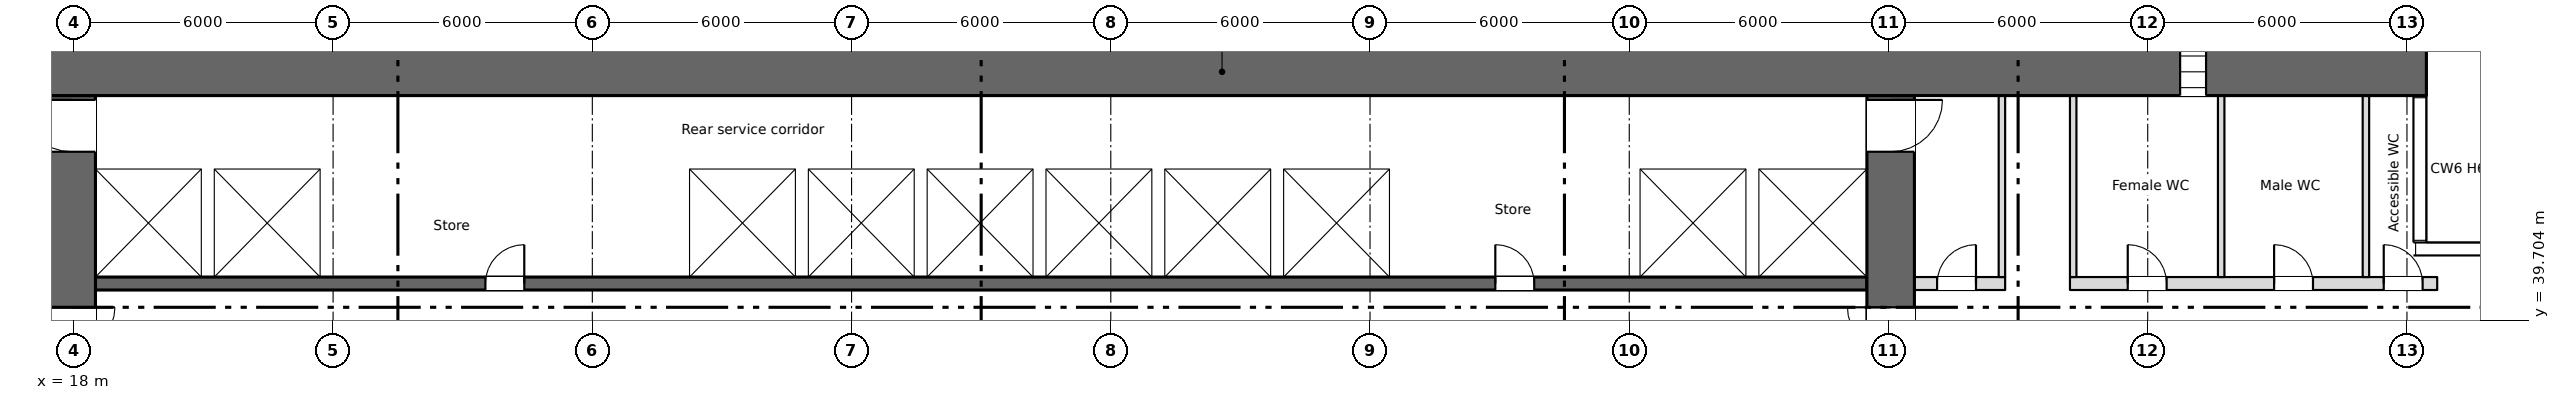
"""IFC4 building model, lengths in metres.
Left out: names, types, materials, properties, quantities, classifications, styles, units other than length and angle.
Written with IfcOpenShell. Run it as: python <this file> out.ifc"""

import sys

from ifc_helpers import new_model, si_unit, direction, frame, frame_2d, origin, place, context, subcontext, project, spatial, rectangle, extrude, element, fill, save


model = new_model("IFC4")
c1 = context("Model", 3, precision=1e-05, world=origin(), true_north=direction((0.0, 1.0)))
c2 = subcontext(c1, "Body", "Model", "MODEL_VIEW")
j1 = project(units=[si_unit("LENGTHUNIT", "METRE"), si_unit("PLANEANGLEUNIT", "RADIAN")], contexts=[c1])
p1 = place(None, origin())
s1 = spatial("IfcSite", under=j1, at=p1, CompositionType="ELEMENT")
p2 = place(p1, origin())
s2 = spatial("IfcBuilding", under=s1, at=p2, CompositionType="ELEMENT")
p3 = place(p2, frame((0.0, 0.0, 11.3)))
s3 = spatial("IfcBuildingStorey", under=s2, at=p3, CompositionType="ELEMENT", Elevation=11.3)
p4 = place(p3, frame((5.55, 45.45, 0.0), z_axis=(0.0, 0.0, 1.0), x_axis=(1.0, 0.0, 0.0)))
e1 = element("IfcWall", 1, at=p4, inside=s3, PredefinedType="SHEAR", context=c2, shape_type="SweptSolid", body=[
    extrude(rectangle(XDim=66.9, YDim=1.1, at=frame_2d((33.45, 0.0))), origin(), (0.0, 0.0, 1.0), 6.1),
])
p5 = place(p4, frame((1.2, 0.0, 0.6)))
e2 = element("IfcOpeningElement", 2, at=p5, cuts=e1, PredefinedType="OPENING", context=c2, shape_type="SweptSolid", body=[
    extrude(rectangle(XDim=0.6, YDim=2.7, at=frame_2d((0.3, 1.35))), frame((0.0, 0.56, 0.0), z_axis=(0.0, -1.0, 0.0), x_axis=(1.0, 0.0, 0.0)), (0.0, 0.0, 1.0), 1.12),
])
p6 = place(p4, frame((7.2, 0.0, 0.6)))
e3 = element("IfcOpeningElement", 3, at=p6, cuts=e1, PredefinedType="OPENING", context=c2, shape_type="SweptSolid", body=[
    extrude(rectangle(XDim=0.6, YDim=2.7, at=frame_2d((0.3, 1.35))), frame((0.0, 0.56, 0.0), z_axis=(0.0, -1.0, 0.0), x_axis=(1.0, 0.0, 0.0)), (0.0, 0.0, 1.0), 1.12),
])
p7 = place(p4, frame((61.2, 0.0, 0.6)))
e4 = element("IfcOpeningElement", 4, at=p7, cuts=e1, PredefinedType="OPENING", context=c2, shape_type="SweptSolid", body=[
    extrude(rectangle(XDim=0.6, YDim=2.7, at=frame_2d((0.3, 1.35))), frame((0.0, 0.56, 0.0), z_axis=(0.0, -1.0, 0.0), x_axis=(1.0, 0.0, 0.0)), (0.0, 0.0, 1.0), 1.12),
])
p8 = place(p3, frame((72.85, 28.4, 0.0), z_axis=(0.0, 0.0, 1.0), x_axis=(0.0, 1.0, 0.0)))
e5 = element("IfcWall", 5, at=p8, inside=s3, PredefinedType="SHEAR", context=c2, shape_type="SweptSolid", body=[
    extrude(rectangle(XDim=12.85, YDim=0.3, at=frame_2d((6.425, 0.0))), origin(), (0.0, 0.0, 1.0), 6.1),
])
p9 = place(p3, frame((17.95, 28.4, 0.0), z_axis=(0.0, 0.0, 1.0), x_axis=(0.0, 1.0, 0.0)))
e6 = element("IfcWall", 6, at=p9, inside=s3, PredefinedType="SHEAR", context=c2, shape_type="SweptSolid", body=[
    extrude(rectangle(XDim=16.5, YDim=1.1, at=frame_2d((8.25, 0.0))), origin(), (0.0, 0.0, 1.0), 6.1),
])
p10 = place(p9, frame((9.6, 0.0, 0.0)))
e7 = element("IfcOpeningElement", 7, at=p10, cuts=e6, PredefinedType="OPENING", context=c2, shape_type="SweptSolid", body=[
    extrude(rectangle(XDim=2.0, YDim=2.1, at=frame_2d((1.0, 1.05))), frame((0.0, 0.56, 0.0), z_axis=(0.0, -1.0, 0.0), x_axis=(1.0, 0.0, 0.0)), (0.0, 0.0, 1.0), 1.12),
])
p11 = place(p9, frame((15.2, 0.0, 0.0)))
e8 = element("IfcOpeningElement", 8, at=p11, cuts=e6, PredefinedType="OPENING", context=c2, shape_type="SweptSolid", body=[
    extrude(rectangle(XDim=1.2, YDim=2.1, at=frame_2d((0.6, 1.05))), frame((0.0, 0.56, 0.0), z_axis=(0.0, -1.0, 0.0), x_axis=(1.0, 0.0, 0.0)), (0.0, 0.0, 1.0), 1.12),
])
p12 = place(p3, frame((60.05, 28.4, 0.0), z_axis=(0.0, 0.0, 1.0), x_axis=(0.0, 1.0, 0.0)))
e9 = element("IfcWall", 9, at=p12, inside=s3, PredefinedType="SHEAR", context=c2, shape_type="SweptSolid", body=[
    extrude(rectangle(XDim=16.5, YDim=1.1, at=frame_2d((8.25, 0.0))), origin(), (0.0, 0.0, 1.0), 6.1),
])
p13 = place(p12, frame((9.6, 0.0, 0.0)))
e10 = element("IfcOpeningElement", 10, at=p13, cuts=e9, PredefinedType="OPENING", context=c2, shape_type="SweptSolid", body=[
    extrude(rectangle(XDim=2.0, YDim=2.1, at=frame_2d((1.0, 1.05))), frame((0.0, 0.56, 0.0), z_axis=(0.0, -1.0, 0.0), x_axis=(1.0, 0.0, 0.0)), (0.0, 0.0, 1.0), 1.12),
])
p14 = place(p12, frame((15.2, 0.0, 0.0)))
e11 = element("IfcOpeningElement", 11, at=p14, cuts=e9, PredefinedType="OPENING", context=c2, shape_type="SweptSolid", body=[
    extrude(rectangle(XDim=1.2, YDim=2.1, at=frame_2d((0.6, 1.05))), frame((0.0, 0.56, 0.0), z_axis=(0.0, -1.0, 0.0), x_axis=(1.0, 0.0, 0.0)), (0.0, 0.0, 1.0), 1.12),
])
p15 = place(p3, frame((18.5, 40.55, 0.0), z_axis=(0.0, 0.0, 1.0), x_axis=(1.0, 0.0, 0.0)))
e12 = element("IfcWall", 12, at=p15, inside=s3, PredefinedType="SHEAR", context=c2, shape_type="SweptSolid", body=[
    extrude(rectangle(XDim=41.0, YDim=0.3, at=frame_2d((20.5, 0.0))), origin(), (0.0, 0.0, 1.0), 6.1),
])
p16 = place(p15, frame((9.025, 0.0, 0.0)))
e13 = element("IfcOpeningElement", 13, at=p16, cuts=e12, PredefinedType="OPENING", context=c2, shape_type="SweptSolid", body=[
    extrude(rectangle(XDim=0.9, YDim=2.1, at=frame_2d((0.45, 1.05))), frame((0.0, 0.16, 0.0), z_axis=(0.0, -1.0, 0.0), x_axis=(1.0, 0.0, 0.0)), (0.0, 0.0, 1.0), 0.32),
])
p17 = place(p15, frame((32.4, 0.0, 0.0)))
e14 = element("IfcOpeningElement", 14, at=p17, cuts=e12, PredefinedType="OPENING", context=c2, shape_type="SweptSolid", body=[
    extrude(rectangle(XDim=0.9, YDim=2.1, at=frame_2d((0.45, 1.05))), frame((0.0, 0.16, 0.0), z_axis=(0.0, -1.0, 0.0), x_axis=(1.0, 0.0, 0.0)), (0.0, 0.0, 1.0), 0.32),
])
p18 = place(p15, frame((14.425, 0.0, 0.0)))
e15 = element("IfcOpeningElement", 15, at=p18, cuts=e12, PredefinedType="OPENING", context=c2, shape_type="SweptSolid", body=[
    extrude(rectangle(XDim=1.1, YDim=2.1, at=frame_2d((0.55, 1.05))), frame((0.0, 0.16, 0.0), z_axis=(0.0, -1.0, 0.0), x_axis=(1.0, 0.0, 0.0)), (0.0, 0.0, 1.0), 0.32),
])
p19 = place(p15, frame((17.175, 0.0, 0.0)))
e16 = element("IfcOpeningElement", 16, at=p19, cuts=e12, PredefinedType="OPENING", context=c2, shape_type="SweptSolid", body=[
    extrude(rectangle(XDim=1.1, YDim=2.1, at=frame_2d((0.55, 1.05))), frame((0.0, 0.16, 0.0), z_axis=(0.0, -1.0, 0.0), x_axis=(1.0, 0.0, 0.0)), (0.0, 0.0, 1.0), 0.32),
])
p20 = place(p15, frame((19.925, 0.0, 0.0)))
e17 = element("IfcOpeningElement", 17, at=p20, cuts=e12, PredefinedType="OPENING", context=c2, shape_type="SweptSolid", body=[
    extrude(rectangle(XDim=1.1, YDim=2.1, at=frame_2d((0.55, 1.05))), frame((0.0, 0.16, 0.0), z_axis=(0.0, -1.0, 0.0), x_axis=(1.0, 0.0, 0.0)), (0.0, 0.0, 1.0), 0.32),
])
p21 = place(p15, frame((22.675, 0.0, 0.0)))
e18 = element("IfcOpeningElement", 18, at=p21, cuts=e12, PredefinedType="OPENING", context=c2, shape_type="SweptSolid", body=[
    extrude(rectangle(XDim=1.1, YDim=2.1, at=frame_2d((0.55, 1.05))), frame((0.0, 0.16, 0.0), z_axis=(0.0, -1.0, 0.0), x_axis=(1.0, 0.0, 0.0)), (0.0, 0.0, 1.0), 0.32),
])
p22 = place(p15, frame((36.375, 0.0, 0.0)))
e19 = element("IfcOpeningElement", 19, at=p22, cuts=e12, PredefinedType="OPENING", context=c2, shape_type="SweptSolid", body=[
    extrude(rectangle(XDim=1.2, YDim=2.1, at=frame_2d((0.6, 1.05))), frame((0.0, 0.16, 0.0), z_axis=(0.0, -1.0, 0.0), x_axis=(1.0, 0.0, 0.0)), (0.0, 0.0, 1.0), 0.32),
])
p23 = place(p15, frame((39.15, 0.0, 0.0)))
e20 = element("IfcOpeningElement", 20, at=p23, cuts=e12, PredefinedType="OPENING", context=c2, shape_type="SweptSolid", body=[
    extrude(rectangle(XDim=1.2, YDim=2.1, at=frame_2d((0.6, 1.05))), frame((0.0, 0.16, 0.0), z_axis=(0.0, -1.0, 0.0), x_axis=(1.0, 0.0, 0.0)), (0.0, 0.0, 1.0), 0.32),
])
p24 = place(p3, frame((18.5, 43.35, 0.0), z_axis=(0.0, 0.0, 1.0), x_axis=(1.0, 0.0, 0.0)))
e21 = element("IfcWall", 21, at=p24, inside=s3, PredefinedType="SHEAR", context=c2, shape_type="SweptSolid", body=[
    extrude(rectangle(XDim=41.0, YDim=0.3, at=frame_2d((20.5, 0.0))), origin(), (0.0, 0.0, 1.0), 6.1),
])
p25 = place(p3, frame((60.6, 40.55, 0.0), z_axis=(0.0, 0.0, 1.0), x_axis=(1.0, 0.0, 0.0)))
e22 = element("IfcWall", 22, at=p25, inside=s3, PredefinedType="PARTITIONING", context=c2, shape_type="SweptSolid", body=[
    extrude(rectangle(XDim=2.1, YDim=0.3, at=frame_2d((1.05, 0.0))), origin(), (0.0, 0.0, 1.0), 6.1),
])
p26 = place(p25, frame((0.525, 0.0, 0.0)))
e23 = element("IfcOpeningElement", 23, at=p26, cuts=e22, PredefinedType="OPENING", context=c2, shape_type="SweptSolid", body=[
    extrude(rectangle(XDim=0.9, YDim=2.1, at=frame_2d((0.45, 1.05))), frame((0.0, 0.16, 0.0), z_axis=(0.0, -1.0, 0.0), x_axis=(1.0, 0.0, 0.0)), (0.0, 0.0, 1.0), 0.32),
])
p27 = place(p3, frame((64.2, 40.55, 0.0), z_axis=(0.0, 0.0, 1.0), x_axis=(1.0, 0.0, 0.0)))
e24 = element("IfcWall", 24, at=p27, inside=s3, PredefinedType="PARTITIONING", context=c2, shape_type="SweptSolid", body=[
    extrude(rectangle(XDim=8.5, YDim=0.3, at=frame_2d((4.25, 0.0))), origin(), (0.0, 0.0, 1.0), 6.1),
])
p28 = place(p27, frame((1.337, 0.0, 0.0)))
e25 = element("IfcOpeningElement", 25, at=p28, cuts=e24, PredefinedType="OPENING", context=c2, shape_type="SweptSolid", body=[
    extrude(rectangle(XDim=0.9, YDim=2.1, at=frame_2d((0.45, 1.05))), frame((0.0, 0.16, 0.0), z_axis=(0.0, -1.0, 0.0), x_axis=(1.0, 0.0, 0.0)), (0.0, 0.0, 1.0), 0.32),
])
p29 = place(p27, frame((4.725, 0.0, 0.0)))
e26 = element("IfcOpeningElement", 26, at=p29, cuts=e24, PredefinedType="OPENING", context=c2, shape_type="SweptSolid", body=[
    extrude(rectangle(XDim=0.9, YDim=2.1, at=frame_2d((0.45, 1.05))), frame((0.0, 0.16, 0.0), z_axis=(0.0, -1.0, 0.0), x_axis=(1.0, 0.0, 0.0)), (0.0, 0.0, 1.0), 0.32),
])
p30 = place(p27, frame((7.262, 0.0, 0.0)))
e27 = element("IfcOpeningElement", 27, at=p30, cuts=e24, PredefinedType="OPENING", context=c2, shape_type="SweptSolid", body=[
    extrude(rectangle(XDim=0.9, YDim=2.1, at=frame_2d((0.45, 1.05))), frame((0.0, 0.16, 0.0), z_axis=(0.0, -1.0, 0.0), x_axis=(1.0, 0.0, 0.0)), (0.0, 0.0, 1.0), 0.32),
])
for number, where, z_axis, x_axis in (
    (28, (21.1, 40.7, 0.0), (0.0, 0.0, 1.0), (0.0, 1.0, 0.0)),
    (29, (23.85, 40.7, 0.0), (0.0, 0.0, 1.0), (0.0, 1.0, 0.0)),
    (30, (32.1, 40.7, 0.0), (0.0, 0.0, 1.0), (0.0, 1.0, 0.0)),
    (31, (34.85, 40.7, 0.0), (0.0, 0.0, 1.0), (0.0, 1.0, 0.0)),
    (32, (37.6, 40.7, 0.0), (0.0, 0.0, 1.0), (0.0, 1.0, 0.0)),
    (33, (40.35, 40.7, 0.0), (0.0, 0.0, 1.0), (0.0, 1.0, 0.0)),
    (34, (43.1, 40.7, 0.0), (0.0, 0.0, 1.0), (0.0, 1.0, 0.0)),
    (35, (45.85, 40.7, 0.0), (0.0, 0.0, 1.0), (0.0, 1.0, 0.0)),
    (36, (48.6, 40.7, 0.0), (0.0, 0.0, 1.0), (0.0, 1.0, 0.0)),
    (37, (54.1, 40.7, 0.0), (0.0, 0.0, 1.0), (0.0, 1.0, 0.0)),
    (38, (56.85, 40.7, 0.0), (0.0, 0.0, 1.0), (0.0, 1.0, 0.0)),
):
    element("IfcWall", number, at=place(p3, frame(where, z_axis=z_axis, x_axis=x_axis)), inside=s3, PredefinedType="SHEAR", context=c2, shape_type="SweptSolid", body=[
        extrude(rectangle(XDim=2.5, YDim=0.3, at=frame_2d((1.25, 0.0))), origin(), (0.0, 0.0, 1.0), 6.1),
    ])
for number, where, z_axis, x_axis in (
    (39, (62.625, 40.7, 0.0), (0.0, 0.0, 1.0), (0.0, 1.0, 0.0)),
    (40, (64.275, 40.7, 0.0), (0.0, 0.0, 1.0), (0.0, 1.0, 0.0)),
    (41, (67.7, 40.7, 0.0), (0.0, 0.0, 1.0), (0.0, 1.0, 0.0)),
    (42, (71.05, 40.7, 0.0), (0.0, 0.0, 1.0), (0.0, 1.0, 0.0)),
):
    element("IfcWall", number, at=place(p3, frame(where, z_axis=z_axis, x_axis=x_axis)), inside=s3, PredefinedType="PARTITIONING", context=c2, shape_type="SweptSolid", body=[
        extrude(rectangle(XDim=4.2, YDim=0.15, at=frame_2d((2.1, 0.0))), origin(), (0.0, 0.0, 1.0), 6.1),
    ])
p31 = place(p7, origin())
e43 = element("IfcWindow", 43, at=p31, inside=s3, PartitioningType="SINGLE_PANEL", PredefinedType="WINDOW", context=c2, shape_type="SweptSolid", body=[
    extrude(rectangle(XDim=0.6, YDim=2.7, at=frame_2d((0.3, 1.35))), frame((0.0, 0.03, 0.0), z_axis=(0.0, -1.0, 0.0), x_axis=(1.0, 0.0, 0.0)), (0.0, 0.0, 1.0), 0.06),
])
fill(e4, e43)
p32 = place(p26, origin())
e44 = element("IfcDoor", 44, at=p32, inside=s3, OperationType="SINGLE_SWING_RIGHT", PredefinedType="DOOR", context=c2, shape_type="SweptSolid", body=[
    extrude(rectangle(XDim=0.9, YDim=2.1, at=frame_2d((0.45, 1.05))), frame((0.0, 0.025, 0.0), z_axis=(0.0, -1.0, 0.0), x_axis=(1.0, 0.0, 0.0)), (0.0, 0.0, 1.0), 0.05),
])
fill(e23, e44)
p33 = place(p28, origin())
e45 = element("IfcDoor", 45, at=p33, inside=s3, OperationType="SINGLE_SWING_LEFT", PredefinedType="DOOR", context=c2, shape_type="SweptSolid", body=[
    extrude(rectangle(XDim=0.9, YDim=2.1, at=frame_2d((0.45, 1.05))), frame((0.0, 0.025, 0.0), z_axis=(0.0, -1.0, 0.0), x_axis=(1.0, 0.0, 0.0)), (0.0, 0.0, 1.0), 0.05),
])
fill(e25, e45)
p34 = place(p29, origin())
e46 = element("IfcDoor", 46, at=p34, inside=s3, OperationType="SINGLE_SWING_LEFT", PredefinedType="DOOR", context=c2, shape_type="SweptSolid", body=[
    extrude(rectangle(XDim=0.9, YDim=2.1, at=frame_2d((0.45, 1.05))), frame((0.0, 0.025, 0.0), z_axis=(0.0, -1.0, 0.0), x_axis=(1.0, 0.0, 0.0)), (0.0, 0.0, 1.0), 0.05),
])
fill(e26, e46)
p35 = place(p30, origin())
e47 = element("IfcDoor", 47, at=p35, inside=s3, OperationType="SINGLE_SWING_LEFT", PredefinedType="DOOR", context=c2, shape_type="SweptSolid", body=[
    extrude(rectangle(XDim=0.9, YDim=2.1, at=frame_2d((0.45, 1.05))), frame((0.0, 0.025, 0.0), z_axis=(0.0, -1.0, 0.0), x_axis=(1.0, 0.0, 0.0)), (0.0, 0.0, 1.0), 0.05),
])
fill(e27, e47)
p36 = place(p16, origin())
e48 = element("IfcDoor", 48, at=p36, inside=s3, OperationType="SINGLE_SWING_RIGHT", PredefinedType="DOOR", context=c2, shape_type="SweptSolid", body=[
    extrude(rectangle(XDim=0.9, YDim=2.1, at=frame_2d((0.45, 1.05))), frame((0.0, 0.025, 0.0), z_axis=(0.0, -1.0, 0.0), x_axis=(1.0, 0.0, 0.0)), (0.0, 0.0, 1.0), 0.05),
])
fill(e13, e48)
p37 = place(p17, origin())
e49 = element("IfcDoor", 49, at=p37, inside=s3, OperationType="SINGLE_SWING_LEFT", PredefinedType="DOOR", context=c2, shape_type="SweptSolid", body=[
    extrude(rectangle(XDim=0.9, YDim=2.1, at=frame_2d((0.45, 1.05))), frame((0.0, 0.025, 0.0), z_axis=(0.0, -1.0, 0.0), x_axis=(1.0, 0.0, 0.0)), (0.0, 0.0, 1.0), 0.05),
])
fill(e14, e49)
p38 = place(p18, origin())
e50 = element("IfcDoor", 50, at=p38, inside=s3, OperationType="SLIDING_TO_LEFT", PredefinedType="DOOR", context=c2, shape_type="SweptSolid", body=[
    extrude(rectangle(XDim=1.1, YDim=2.1, at=frame_2d((0.55, 1.05))), frame((0.0, 0.025, 0.0), z_axis=(0.0, -1.0, 0.0), x_axis=(1.0, 0.0, 0.0)), (0.0, 0.0, 1.0), 0.05),
])
fill(e15, e50)
p39 = place(p19, origin())
e51 = element("IfcDoor", 51, at=p39, inside=s3, OperationType="SLIDING_TO_LEFT", PredefinedType="DOOR", context=c2, shape_type="SweptSolid", body=[
    extrude(rectangle(XDim=1.1, YDim=2.1, at=frame_2d((0.55, 1.05))), frame((0.0, 0.025, 0.0), z_axis=(0.0, -1.0, 0.0), x_axis=(1.0, 0.0, 0.0)), (0.0, 0.0, 1.0), 0.05),
])
fill(e16, e51)
p40 = place(p20, origin())
e52 = element("IfcDoor", 52, at=p40, inside=s3, OperationType="SLIDING_TO_LEFT", PredefinedType="DOOR", context=c2, shape_type="SweptSolid", body=[
    extrude(rectangle(XDim=1.1, YDim=2.1, at=frame_2d((0.55, 1.05))), frame((0.0, 0.025, 0.0), z_axis=(0.0, -1.0, 0.0), x_axis=(1.0, 0.0, 0.0)), (0.0, 0.0, 1.0), 0.05),
])
fill(e17, e52)
p41 = place(p21, origin())
e53 = element("IfcDoor", 53, at=p41, inside=s3, OperationType="SLIDING_TO_LEFT", PredefinedType="DOOR", context=c2, shape_type="SweptSolid", body=[
    extrude(rectangle(XDim=1.1, YDim=2.1, at=frame_2d((0.55, 1.05))), frame((0.0, 0.025, 0.0), z_axis=(0.0, -1.0, 0.0), x_axis=(1.0, 0.0, 0.0)), (0.0, 0.0, 1.0), 0.05),
])
fill(e18, e53)
p42 = place(p22, origin())
e54 = element("IfcDoor", 54, at=p42, inside=s3, OperationType="SLIDING_TO_LEFT", PredefinedType="DOOR", context=c2, shape_type="SweptSolid", body=[
    extrude(rectangle(XDim=1.2, YDim=2.1, at=frame_2d((0.6, 1.05))), frame((0.0, 0.025, 0.0), z_axis=(0.0, -1.0, 0.0), x_axis=(1.0, 0.0, 0.0)), (0.0, 0.0, 1.0), 0.05),
])
fill(e19, e54)
p43 = place(p23, origin())
e55 = element("IfcDoor", 55, at=p43, inside=s3, OperationType="SLIDING_TO_LEFT", PredefinedType="DOOR", context=c2, shape_type="SweptSolid", body=[
    extrude(rectangle(XDim=1.2, YDim=2.1, at=frame_2d((0.6, 1.05))), frame((0.0, 0.025, 0.0), z_axis=(0.0, -1.0, 0.0), x_axis=(1.0, 0.0, 0.0)), (0.0, 0.0, 1.0), 0.05),
])
fill(e20, e55)
p44 = place(p10, origin())
e56 = element("IfcDoor", 56, at=p44, inside=s3, OperationType="DOUBLE_DOOR_SINGLE_SWING", PredefinedType="DOOR", context=c2, shape_type="SweptSolid", body=[
    extrude(rectangle(XDim=2.0, YDim=2.1, at=frame_2d((1.0, 1.05))), frame((0.0, 0.025, 0.0), z_axis=(0.0, -1.0, 0.0), x_axis=(1.0, 0.0, 0.0)), (0.0, 0.0, 1.0), 0.05),
])
fill(e7, e56)
p45 = place(p13, origin())
e57 = element("IfcDoor", 57, at=p45, inside=s3, OperationType="DOUBLE_DOOR_SINGLE_SWING", PredefinedType="DOOR", context=c2, shape_type="SweptSolid", body=[
    extrude(rectangle(XDim=2.0, YDim=2.1, at=frame_2d((1.0, 1.05))), frame((0.0, 0.025, 0.0), z_axis=(0.0, -1.0, 0.0), x_axis=(1.0, 0.0, 0.0)), (0.0, 0.0, 1.0), 0.05),
])
fill(e10, e57)
p46 = place(p11, origin())
e58 = element("IfcDoor", 58, at=p46, inside=s3, OperationType="SINGLE_SWING_RIGHT", PredefinedType="DOOR", context=c2, shape_type="SweptSolid", body=[
    extrude(rectangle(XDim=1.2, YDim=2.1, at=frame_2d((0.6, 1.05))), frame((0.0, 0.025, 0.0), z_axis=(0.0, -1.0, 0.0), x_axis=(1.0, 0.0, 0.0)), (0.0, 0.0, 1.0), 0.05),
])
fill(e8, e58)
p47 = place(p14, origin())
e59 = element("IfcDoor", 59, at=p47, inside=s3, OperationType="SINGLE_SWING_RIGHT", PredefinedType="DOOR", context=c2, shape_type="SweptSolid", body=[
    extrude(rectangle(XDim=1.2, YDim=2.1, at=frame_2d((0.6, 1.05))), frame((0.0, 0.025, 0.0), z_axis=(0.0, -1.0, 0.0), x_axis=(1.0, 0.0, 0.0)), (0.0, 0.0, 1.0), 0.05),
])
fill(e11, e59)
save(model, sys.argv[1])
